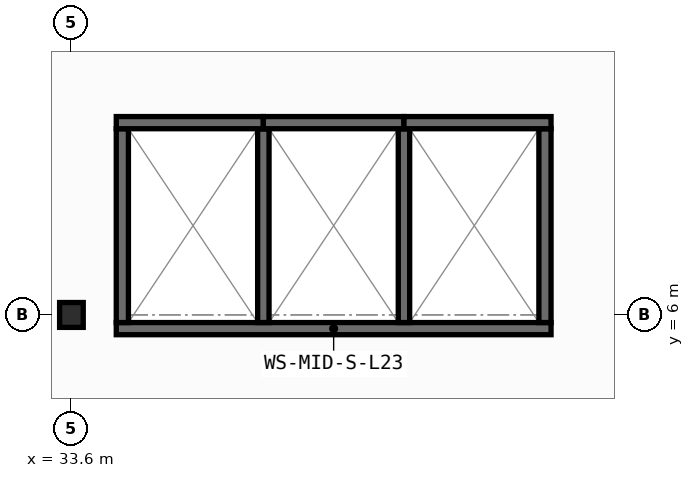
"""IFC4 building model, lengths in metres.
Left out: names, types, materials, properties, quantities, classifications, styles, units other than length and angle.
Written with IfcOpenShell. Run it as: python <this file> out.ifc"""

import sys

from ifc_helpers import new_model, si_unit, direction, frame, frame_2d, origin, origin_2d, place, context, subcontext, project, spatial, rectangle, i_section, extrude, element, save


model = new_model("IFC4")
c1 = context("Model", 3, precision=1e-05, world=origin(), true_north=direction((0.0, 1.0)))
c2 = subcontext(c1, "Body", "Model", "MODEL_VIEW")
j1 = project(units=[si_unit("LENGTHUNIT", "METRE"), si_unit("PLANEANGLEUNIT", "RADIAN")], contexts=[c1])
p1 = place(None, origin())
s1 = spatial("IfcSite", under=j1, at=p1, CompositionType="ELEMENT")
p2 = place(p1, origin())
s2 = spatial("IfcBuilding", under=s1, at=p2, CompositionType="ELEMENT")
p3 = place(p2, frame((0.0, 0.0, 93.6)))
s3 = spatial("IfcBuildingStorey", under=s2, at=p3, CompositionType="ELEMENT", Elevation=93.6)
p4 = place(p3, frame((33.6, 6.0, 0.0), z_axis=(0.0, 0.0, 1.0), x_axis=(1.0, 0.0, 0.0)))
e1 = element("IfcColumn", 1, at=p4, inside=s3, PredefinedType="COLUMN", context=c2, shape_type="SweptSolid", body=[
    extrude(i_section(OverallWidth=0.311, OverallDepth=0.327, WebThickness=0.016, FlangeThickness=0.025, FilletRadius=0.017, at=origin_2d()), origin(), (0.0, 0.0, 1.0), 3.95),
])
p5 = place(p3, frame((34.19, 5.82, 0.0), z_axis=(0.0, 0.0, 1.0), x_axis=(1.0, 0.0, 0.0)))
e2 = element("IfcWall", 2, at=p5, inside=s3, PredefinedType="SHEAR", context=c2, shape_type="SweptSolid", body=[
    extrude(rectangle(XDim=5.72, YDim=0.16, at=frame_2d((2.86, 0.0))), origin(), (0.0, 0.0, 1.0), 3.67),
])
for number, where, z_axis, x_axis in (
    (3, (34.27, 5.9, 0.0), (0.0, 0.0, 1.0), (0.0, 1.0, 0.0)),
    (4, (39.83, 5.9, 0.0), (0.0, 0.0, 1.0), (0.0, 1.0, 0.0)),
):
    element("IfcWall", number, at=place(p3, frame(where, z_axis=z_axis, x_axis=x_axis)), inside=s3, PredefinedType="SHEAR", context=c2, shape_type="SweptSolid", body=[
        extrude(rectangle(XDim=2.55, YDim=0.16, at=frame_2d((1.275, 0.0))), origin(), (0.0, 0.0, 1.0), 3.67),
    ])
for number, where, z_axis, x_axis in (
    (5, (36.125, 5.9, 0.0), (0.0, 0.0, 1.0), (0.0, 1.0, 0.0)),
    (6, (37.975, 5.9, 0.0), (0.0, 0.0, 1.0), (0.0, 1.0, 0.0)),
):
    element("IfcWall", number, at=place(p3, frame(where, z_axis=z_axis, x_axis=x_axis)), inside=s3, PredefinedType="SHEAR", context=c2, shape_type="SweptSolid", body=[
        extrude(rectangle(XDim=2.55, YDim=0.15, at=frame_2d((1.275, 0.0))), origin(), (0.0, 0.0, 1.0), 3.67),
    ])
p6 = place(p3, frame((34.19, 8.53, 0.0), z_axis=(0.0, 0.0, 1.0), x_axis=(1.0, 0.0, 0.0)))
e7 = element("IfcWall", 7, at=p6, inside=s3, PredefinedType="SHEAR", context=c2, shape_type="SweptSolid", body=[
    extrude(rectangle(XDim=1.935, YDim=0.16, at=frame_2d((0.968, 0.0))), origin(), (0.0, 0.0, 1.0), 3.67),
])
p7 = place(p3, frame((36.125, 8.53, 0.0), z_axis=(0.0, 0.0, 1.0), x_axis=(1.0, 0.0, 0.0)))
e8 = element("IfcWall", 8, at=p7, inside=s3, PredefinedType="SHEAR", context=c2, shape_type="SweptSolid", body=[
    extrude(rectangle(XDim=1.85, YDim=0.16, at=frame_2d((0.925, 0.0))), origin(), (0.0, 0.0, 1.0), 3.67),
])
p8 = place(p3, frame((37.975, 8.53, 0.0), z_axis=(0.0, 0.0, 1.0), x_axis=(1.0, 0.0, 0.0)))
e9 = element("IfcWall", 9, at=p8, inside=s3, PredefinedType="SHEAR", context=c2, shape_type="SweptSolid", body=[
    extrude(rectangle(XDim=1.935, YDim=0.16, at=frame_2d((0.967, 0.0))), origin(), (0.0, 0.0, 1.0), 3.67),
])
save(model, sys.argv[1])
